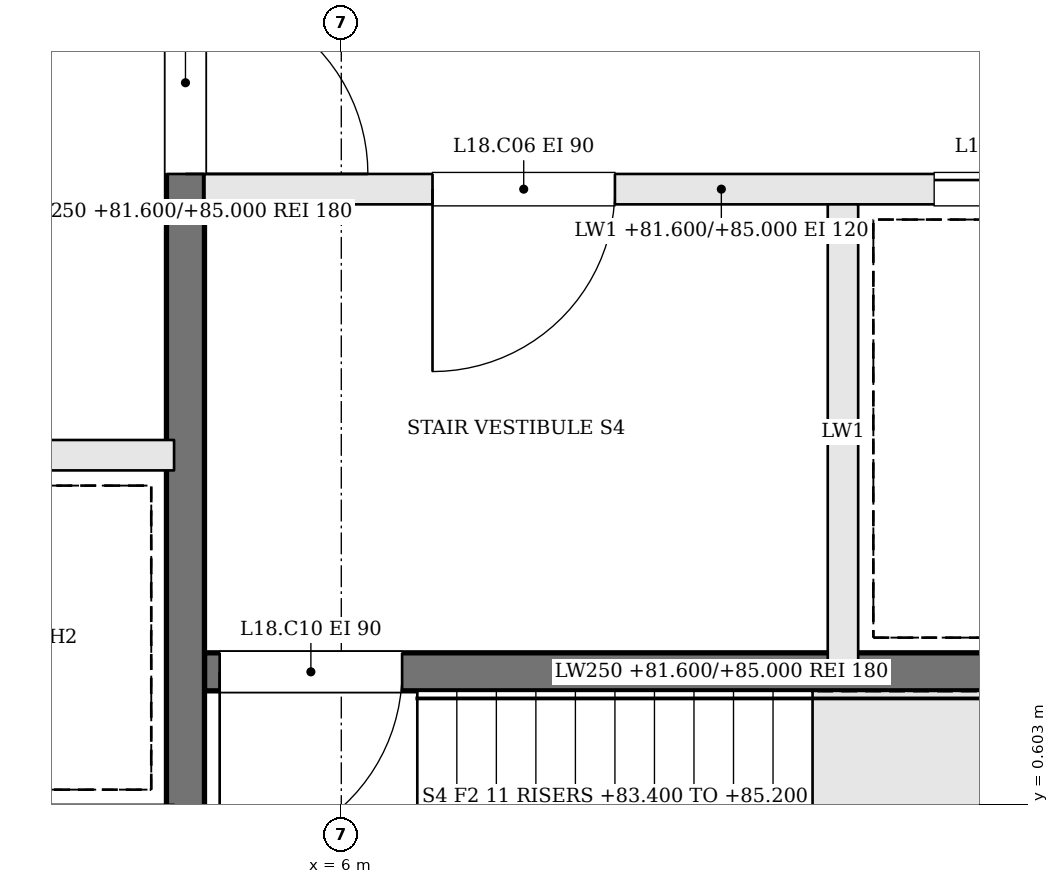
"""IFC4 building model, lengths in metres.
Left out: names, types, materials, properties, quantities, classifications, styles, units other than length and angle.
Written with IfcOpenShell. Run it as: python <this file> out.ifc"""

import sys

from ifc_helpers import new_model, si_unit, direction, frame, frame_2d, origin, place, context, subcontext, project, spatial, rectangle, extrude, element, fill, save


model = new_model("IFC4")
c1 = context("Model", 3, precision=1e-05, world=origin(), true_north=direction((0.0, 1.0)))
c2 = subcontext(c1, "Body", "Model", "MODEL_VIEW")
j1 = project(units=[si_unit("LENGTHUNIT", "METRE"), si_unit("PLANEANGLEUNIT", "RADIAN")], contexts=[c1])
p1 = place(None, origin())
s1 = spatial("IfcSite", under=j1, at=p1, CompositionType="ELEMENT")
p2 = place(p1, origin())
s2 = spatial("IfcBuilding", under=s1, at=p2, CompositionType="ELEMENT")
p3 = place(p2, frame((0.0, 0.0, 81.6)))
s3 = spatial("IfcBuildingStorey", under=s2, at=p3, CompositionType="ELEMENT", Elevation=81.6)
p4 = place(p3, frame((11.9, 4.65, 0.0), z_axis=(0.0, 0.0, 1.0), x_axis=(-1.0, 0.0, 0.0)))
e1 = element("IfcWall", 1, at=p4, inside=s3, PredefinedType="SOLIDWALL", context=c2, shape_type="SweptSolid", body=[
    extrude(rectangle(XDim=6.8, YDim=0.2, at=frame_2d((3.4, 0.0))), origin(), (0.0, 0.0, 1.0), 3.4),
])
p5 = place(p4, frame((4.1, 0.0, 0.0)))
e2 = element("IfcOpeningElement", 2, at=p5, cuts=e1, PredefinedType="OPENING", context=c2, shape_type="SweptSolid", body=[
    extrude(rectangle(XDim=1.2, YDim=2.1, at=frame_2d((0.6, 1.05))), frame((0.0, 0.11, 0.0), z_axis=(0.0, -1.0, 0.0), x_axis=(1.0, 0.0, 0.0)), (0.0, 0.0, 1.0), 0.22),
])
p6 = place(p4, frame((0.8, 0.0, 0.0)))
e3 = element("IfcOpeningElement", 3, at=p6, cuts=e1, PredefinedType="OPENING", context=c2, shape_type="SweptSolid", body=[
    extrude(rectangle(XDim=1.2, YDim=2.1, at=frame_2d((0.6, 1.05))), frame((0.0, 0.11, 0.0), z_axis=(0.0, -1.0, 0.0), x_axis=(1.0, 0.0, 0.0)), (0.0, 0.0, 1.0), 0.22),
])
p7 = place(p3, frame((11.9, 1.475, 0.0), z_axis=(0.0, 0.0, 1.0), x_axis=(-1.0, 0.0, 0.0)))
e4 = element("IfcWall", 4, at=p7, inside=s3, PredefinedType="SOLIDWALL", context=c2, shape_type="SweptSolid", body=[
    extrude(rectangle(XDim=6.8, YDim=0.25, at=frame_2d((3.4, 0.0))), origin(), (0.0, 0.0, 1.0), 3.4),
])
p8 = place(p7, frame((5.5, 0.0, 0.0)))
e5 = element("IfcOpeningElement", 5, at=p8, cuts=e4, PredefinedType="OPENING", context=c2, shape_type="SweptSolid", body=[
    extrude(rectangle(XDim=1.2, YDim=2.1, at=frame_2d((0.6, 1.05))), frame((0.0, 0.135, 0.0), z_axis=(0.0, -1.0, 0.0), x_axis=(1.0, 0.0, 0.0)), (0.0, 0.0, 1.0), 0.27),
])
p9 = place(p3, frame((9.3, 4.55, 0.0), z_axis=(0.0, 0.0, 1.0), x_axis=(0.0, -1.0, 0.0)))
e6 = element("IfcWall", 6, at=p9, inside=s3, PredefinedType="SOLIDWALL", context=c2, shape_type="SweptSolid", body=[
    extrude(rectangle(XDim=3.0, YDim=0.2, at=frame_2d((1.5, 0.0))), origin(), (0.0, 0.0, 1.0), 3.4),
])
p10 = place(p3, frame((4.975, 10.9, 0.0), z_axis=(0.0, 0.0, 1.0), x_axis=(0.0, -1.0, 0.0)))
e7 = element("IfcWall", 7, at=p10, inside=s3, PredefinedType="SOLIDWALL", context=c2, shape_type="SweptSolid", body=[
    extrude(rectangle(XDim=12.8, YDim=0.25, at=frame_2d((6.4, 0.0))), origin(), (0.0, 0.0, 1.0), 3.4),
])
p11 = place(p10, frame((4.95, 0.0, 0.0)))
e8 = element("IfcOpeningElement", 8, at=p11, cuts=e7, PredefinedType="OPENING", context=c2, shape_type="SweptSolid", body=[
    extrude(rectangle(XDim=1.2, YDim=2.1, at=frame_2d((0.6, 1.05))), frame((0.0, 0.135, 0.0), z_axis=(0.0, -1.0, 0.0), x_axis=(1.0, 0.0, 0.0)), (0.0, 0.0, 1.0), 0.27),
])
p12 = place(p3, frame((-4.9, 2.9, 0.0), z_axis=(0.0, 0.0, 1.0), x_axis=(1.0, 0.0, 0.0)))
e9 = element("IfcWall", 9, at=p12, inside=s3, PredefinedType="SOLIDWALL", context=c2, shape_type="SweptSolid", body=[
    extrude(rectangle(XDim=9.8, YDim=0.2, at=frame_2d((4.9, 0.0))), origin(), (0.0, 0.0, 1.0), 3.4),
])
p13 = place(p12, frame((0.675, 0.0, 0.0)))
e10 = element("IfcOpeningElement", 10, at=p13, cuts=e9, PredefinedType="OPENING", context=c2, shape_type="SweptSolid", body=[
    extrude(rectangle(XDim=1.1, YDim=2.1, at=frame_2d((0.55, 1.05))), frame((0.0, 0.11, 0.0), z_axis=(0.0, -1.0, 0.0), x_axis=(1.0, 0.0, 0.0)), (0.0, 0.0, 1.0), 0.22),
])
p14 = place(p12, frame((3.125, 0.0, 0.0)))
e11 = element("IfcOpeningElement", 11, at=p14, cuts=e9, PredefinedType="OPENING", context=c2, shape_type="SweptSolid", body=[
    extrude(rectangle(XDim=1.1, YDim=2.1, at=frame_2d((0.55, 1.05))), frame((0.0, 0.11, 0.0), z_axis=(0.0, -1.0, 0.0), x_axis=(1.0, 0.0, 0.0)), (0.0, 0.0, 1.0), 0.22),
])
p15 = place(p11, origin())
e12 = element("IfcDoor", 12, at=p15, inside=s3, OperationType="SINGLE_SWING_RIGHT", PredefinedType="DOOR", context=c2, shape_type="SweptSolid", body=[
    extrude(rectangle(XDim=1.2, YDim=2.1, at=frame_2d((0.6, 1.05))), frame((0.0, 0.025, 0.0), z_axis=(0.0, -1.0, 0.0), x_axis=(1.0, 0.0, 0.0)), (0.0, 0.0, 1.0), 0.05),
])
fill(e8, e12)
p16 = place(p5, origin())
e13 = element("IfcDoor", 13, at=p16, inside=s3, OperationType="SINGLE_SWING_RIGHT", PredefinedType="DOOR", context=c2, shape_type="SweptSolid", body=[
    extrude(rectangle(XDim=1.2, YDim=2.1, at=frame_2d((0.6, 1.05))), frame((0.0, 0.025, 0.0), z_axis=(0.0, -1.0, 0.0), x_axis=(1.0, 0.0, 0.0)), (0.0, 0.0, 1.0), 0.05),
])
fill(e2, e13)
p17 = place(p8, origin())
e14 = element("IfcDoor", 14, at=p17, inside=s3, OperationType="SINGLE_SWING_RIGHT", PredefinedType="DOOR", context=c2, shape_type="SweptSolid", body=[
    extrude(rectangle(XDim=1.2, YDim=2.1, at=frame_2d((0.6, 1.05))), frame((0.0, 0.025, 0.0), z_axis=(0.0, -1.0, 0.0), x_axis=(1.0, 0.0, 0.0)), (0.0, 0.0, 1.0), 0.05),
])
fill(e5, e14)
p18 = place(p6, origin())
e15 = element("IfcDoor", 15, at=p18, inside=s3, OperationType="SLIDING_TO_RIGHT", PredefinedType="DOOR", context=c2, shape_type="SweptSolid", body=[
    extrude(rectangle(XDim=1.2, YDim=2.1, at=frame_2d((0.6, 1.05))), frame((0.0, 0.025, 0.0), z_axis=(0.0, -1.0, 0.0), x_axis=(1.0, 0.0, 0.0)), (0.0, 0.0, 1.0), 0.05),
])
fill(e3, e15)
save(model, sys.argv[1])
